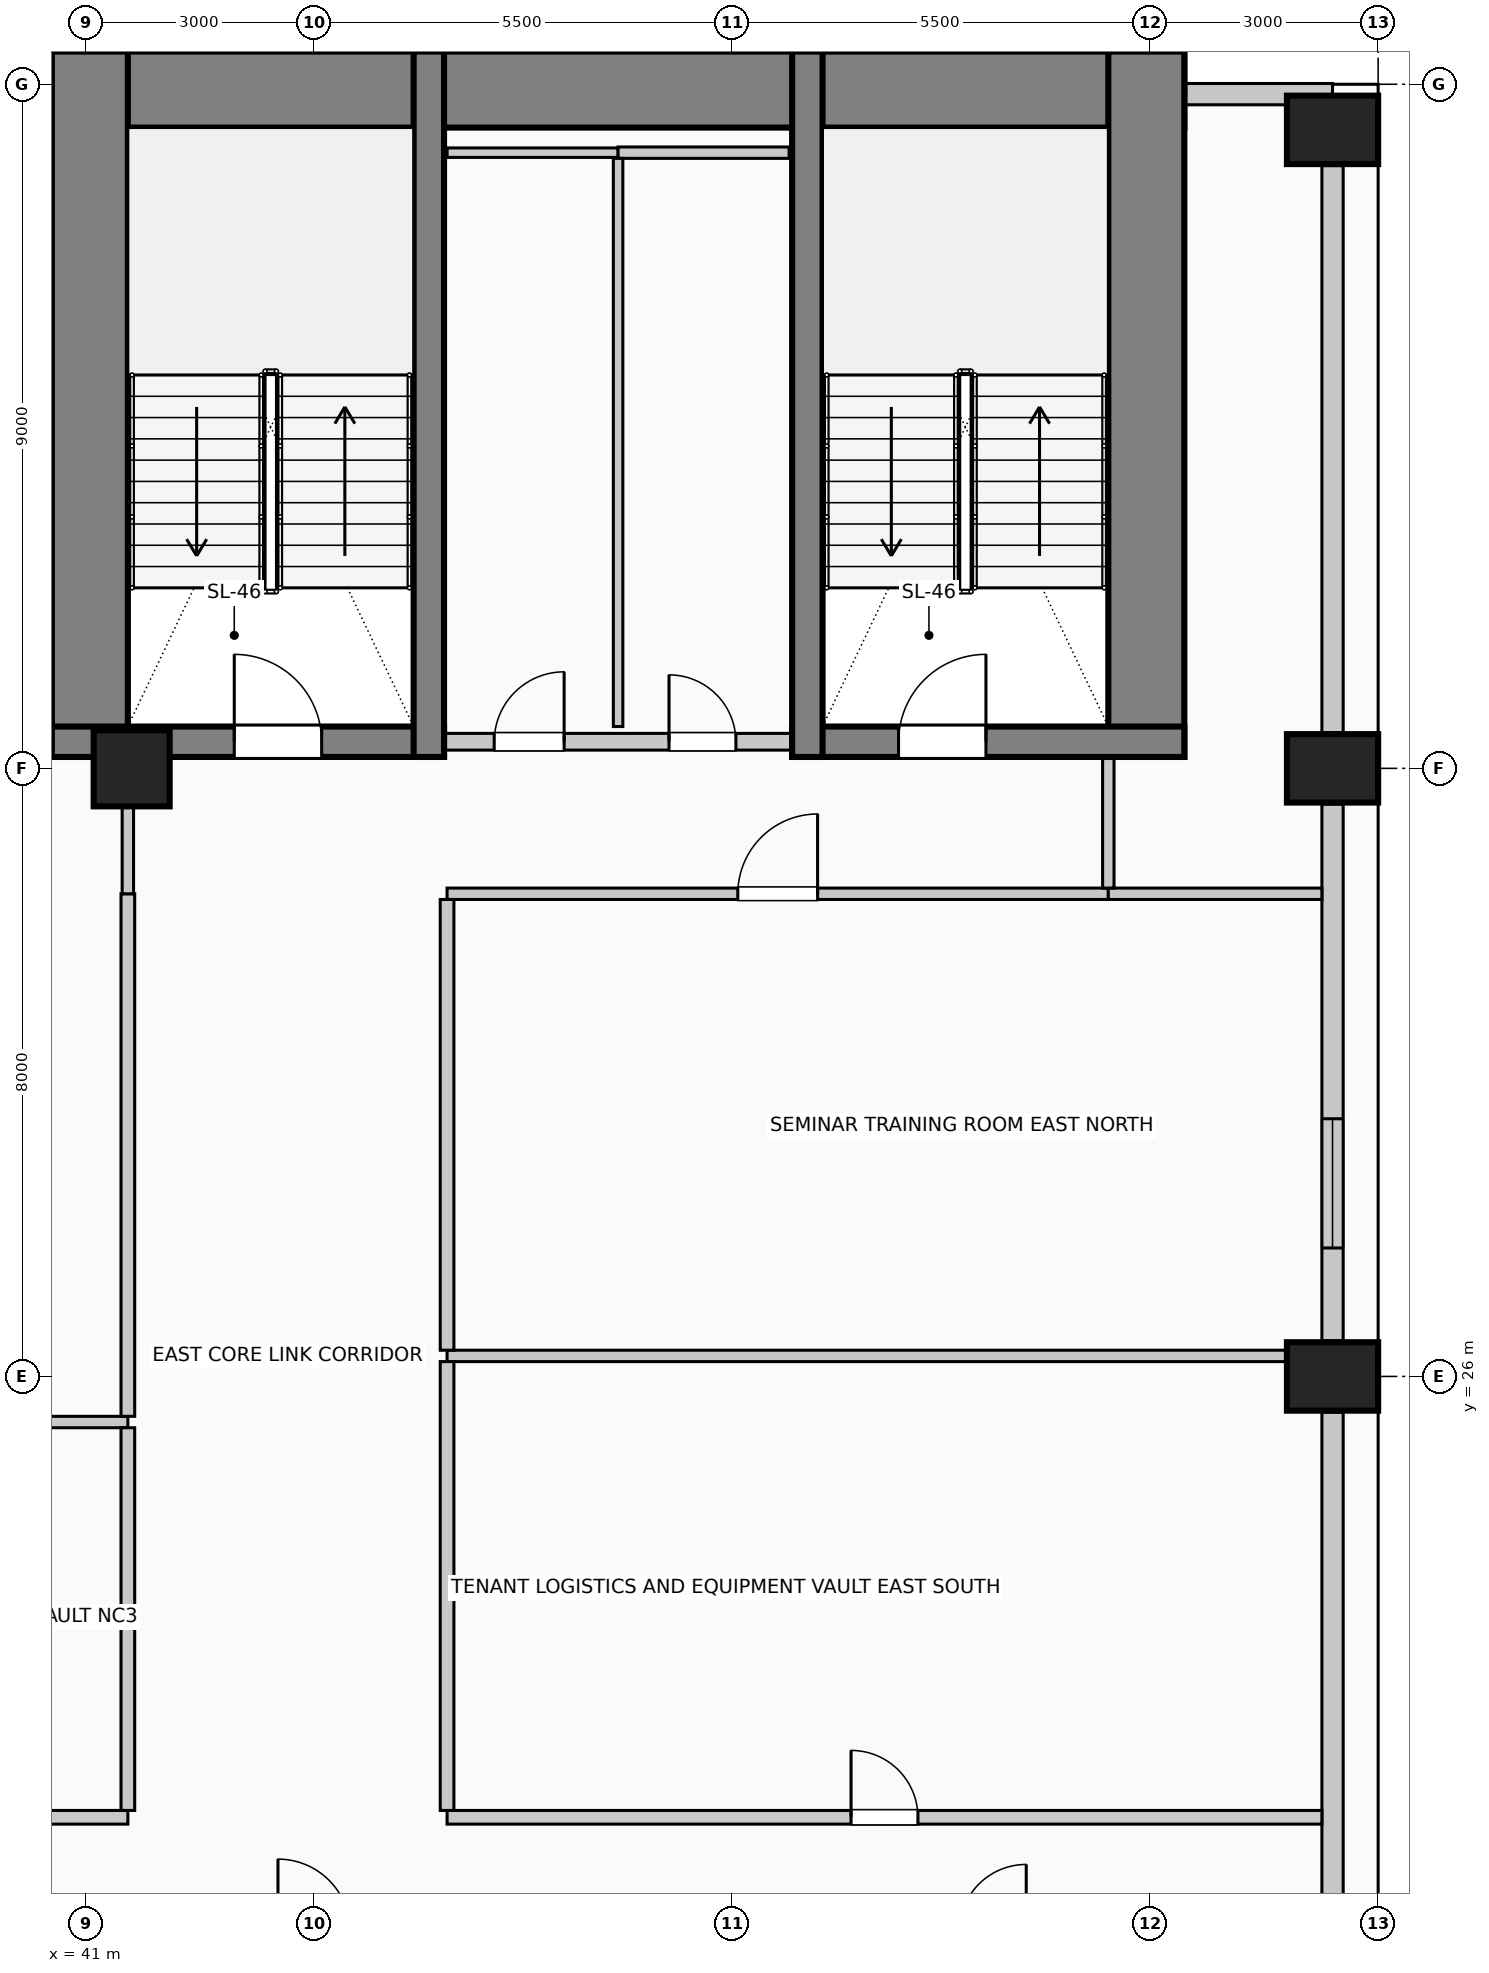
"""IFC4 building model, lengths in metres.
Left out: names, types, materials, properties, quantities, classifications, styles, units other than length and angle.
Written with IfcOpenShell. Run it as: python <this file> out.ifc"""

import sys

from ifc_helpers import new_model, si_unit, direction, frame, frame_2d, origin, origin_2d, place, context, subcontext, project, spatial, rectangle, circle, extrude, element, fill, save


model = new_model("IFC4")
c1 = context("Model", 3, precision=1e-05, world=origin(), true_north=direction((0.0, 1.0)))
c2 = subcontext(c1, "Body", "Model", "MODEL_VIEW")
j1 = project(units=[si_unit("LENGTHUNIT", "METRE"), si_unit("PLANEANGLEUNIT", "RADIAN")], contexts=[c1])
p1 = place(None, origin())
s1 = spatial("IfcSite", under=j1, at=p1, CompositionType="ELEMENT")
p2 = place(p1, origin())
s2 = spatial("IfcBuilding", under=s1, at=p2, CompositionType="ELEMENT")
p3 = place(p2, frame((0.0, 0.0, 78.6)))
s3 = spatial("IfcBuildingStorey", under=s2, at=p3, CompositionType="ELEMENT", Elevation=78.6)
p4 = place(p3, frame((40.55, 42.93, 0.0), z_axis=(0.0, 0.0, 1.0), x_axis=(1.0, 0.0, 0.0)))
e1 = element("IfcWall", 1, at=p4, inside=s3, PredefinedType="SHEAR", context=c2, shape_type="SweptSolid", body=[
    extrude(rectangle(XDim=14.9, YDim=1.0, at=frame_2d((7.45, 0.0))), origin(), (0.0, 0.0, 1.0), 4.0),
])
for number, where, z_axis, x_axis in (
    (2, (41.05, 34.15, 0.0), (0.0, 0.0, 1.0), (0.0, 1.0, 0.0)),
    (3, (54.95, 34.15, 0.0), (0.0, 0.0, 1.0), (0.0, 1.0, 0.0)),
):
    element("IfcWall", number, at=place(p3, frame(where, z_axis=z_axis, x_axis=x_axis)), inside=s3, PredefinedType="SHEAR", context=c2, shape_type="SweptSolid", body=[
        extrude(rectangle(XDim=9.28, YDim=1.0, at=frame_2d((4.64, 0.0))), origin(), (0.0, 0.0, 1.0), 4.0),
    ])
p5 = place(p3, frame((40.55, 34.35, 0.0), z_axis=(0.0, 0.0, 1.0), x_axis=(1.0, 0.0, 0.0)))
e4 = element("IfcWall", 4, at=p5, inside=s3, PredefinedType="SHEAR", context=c2, shape_type="SweptSolid", body=[
    extrude(rectangle(XDim=5.16, YDim=0.4, at=frame_2d((2.58, 0.0))), origin(), (0.0, 0.0, 1.0), 4.0),
])
p6 = place(p5, frame((2.4, 0.0, 0.0)))
e5 = element("IfcOpeningElement", 5, at=p6, cuts=e4, PredefinedType="OPENING", context=c2, shape_type="SweptSolid", body=[
    extrude(rectangle(XDim=1.15, YDim=2.2, at=frame_2d((0.575, 1.1))), frame((0.0, 0.21, 0.0), z_axis=(0.0, -1.0, 0.0), x_axis=(1.0, 0.0, 0.0)), (0.0, 0.0, 1.0), 0.42),
])
p7 = place(p3, frame((45.51, 34.15, 0.0), z_axis=(0.0, 0.0, 1.0), x_axis=(0.0, 1.0, 0.0)))
e6 = element("IfcWall", 6, at=p7, inside=s3, PredefinedType="SHEAR", context=c2, shape_type="SweptSolid", body=[
    extrude(rectangle(XDim=9.28, YDim=0.4, at=frame_2d((4.64, 0.0))), origin(), (0.0, 0.0, 1.0), 4.0),
])
p8 = place(p3, frame((50.29, 34.35, 0.0), z_axis=(0.0, 0.0, 1.0), x_axis=(1.0, 0.0, 0.0)))
e7 = element("IfcWall", 7, at=p8, inside=s3, PredefinedType="SHEAR", context=c2, shape_type="SweptSolid", body=[
    extrude(rectangle(XDim=5.16, YDim=0.4, at=frame_2d((2.58, 0.0))), origin(), (0.0, 0.0, 1.0), 4.0),
])
p9 = place(p8, frame((1.4, 0.0, 0.0)))
e8 = element("IfcOpeningElement", 8, at=p9, cuts=e7, PredefinedType="OPENING", context=c2, shape_type="SweptSolid", body=[
    extrude(rectangle(XDim=1.15, YDim=2.2, at=frame_2d((0.575, 1.1))), frame((0.0, 0.21, 0.0), z_axis=(0.0, -1.0, 0.0), x_axis=(1.0, 0.0, 0.0)), (0.0, 0.0, 1.0), 0.42),
])
p10 = place(p3, frame((50.49, 34.15, 0.0), z_axis=(0.0, 0.0, 1.0), x_axis=(0.0, 1.0, 0.0)))
e9 = element("IfcWall", 9, at=p10, inside=s3, PredefinedType="SHEAR", context=c2, shape_type="SweptSolid", body=[
    extrude(rectangle(XDim=9.28, YDim=0.4, at=frame_2d((4.64, 0.0))), origin(), (0.0, 0.0, 1.0), 4.0),
])
for number, where, z_axis, x_axis in (
    (10, (57.4, 26.0, 0.0), (0.0, 0.0, 1.0), (0.0, 1.0, 0.0)),
    (11, (57.4, 34.0, 0.0), (0.0, 0.0, 1.0), (0.0, 1.0, 0.0)),
    (12, (57.4, 42.4, 0.0), (0.0, 0.0, 1.0), (0.0, 1.0, 0.0)),
):
    element("IfcColumn", number, at=place(p3, frame(where, z_axis=z_axis, x_axis=x_axis)), inside=s3, PredefinedType="COLUMN", context=c2, shape_type="SweptSolid", body=[
        extrude(rectangle(XDim=0.9, YDim=1.2, at=origin_2d()), origin(), (0.0, 0.0, 1.0), 4.0),
    ])
p11 = place(p3, frame((41.6, 34.0, 0.0), z_axis=(0.0, 0.0, 1.0), x_axis=(1.0, 0.0, 0.0)))
e13 = element("IfcColumn", 13, at=p11, inside=s3, PredefinedType="COLUMN", context=c2, shape_type="SweptSolid", body=[
    extrude(circle(Radius=0.5, at=origin_2d()), origin(), (0.0, 0.0, 1.0), 4.0),
])
p12 = place(p3, frame((57.4, 25.53, 0.0), z_axis=(0.0, 0.0, 1.0), x_axis=(0.0, -1.0, 0.0)))
e14 = element("IfcWall", 14, at=p12, inside=s3, PredefinedType="SOLIDWALL", context=c2, shape_type="SweptSolid", body=[
    extrude(rectangle(XDim=7.06, YDim=0.28, at=frame_2d((3.53, 0.0))), origin(), (0.0, 0.0, 1.0), 2.81),
])
p13 = place(p3, frame((57.4, 33.53, 0.0), z_axis=(0.0, 0.0, 1.0), x_axis=(0.0, -1.0, 0.0)))
e15 = element("IfcWall", 15, at=p13, inside=s3, PredefinedType="SOLIDWALL", context=c2, shape_type="SweptSolid", body=[
    extrude(rectangle(XDim=7.06, YDim=0.28, at=frame_2d((3.53, 0.0))), origin(), (0.0, 0.0, 1.0), 2.81),
])
p14 = place(p13, frame((4.14, 0.0, 0.5)))
e16 = element("IfcOpeningElement", 16, at=p14, cuts=e15, PredefinedType="OPENING", context=c2, shape_type="SweptSolid", body=[
    extrude(rectangle(XDim=1.7, YDim=1.95, at=frame_2d((0.85, 0.975))), frame((0.0, 0.15, 0.0), z_axis=(0.0, -1.0, 0.0), x_axis=(1.0, 0.0, 0.0)), (0.0, 0.0, 1.0), 0.3),
])
p15 = place(p3, frame((57.4, 41.93, 0.0), z_axis=(0.0, 0.0, 1.0), x_axis=(0.0, -1.0, 0.0)))
e17 = element("IfcWall", 17, at=p15, inside=s3, PredefinedType="SOLIDWALL", context=c2, shape_type="SweptSolid", body=[
    extrude(rectangle(XDim=7.46, YDim=0.28, at=frame_2d((3.73, 0.0))), origin(), (0.0, 0.0, 1.0), 2.81),
])
p16 = place(p3, frame((55.455, 42.87, 0.0), z_axis=(0.0, 0.0, 1.0), x_axis=(1.0, 0.0, 0.0)))
e18 = element("IfcWall", 18, at=p16, inside=s3, PredefinedType="SOLIDWALL", context=c2, shape_type="SweptSolid", body=[
    extrude(rectangle(XDim=1.945, YDim=0.28, at=frame_2d((0.972, 0.0))), origin(), (0.0, 0.0, 1.0), 3.66),
])
p17 = place(p3, frame((45.72, 34.35, 0.0), z_axis=(0.0, 0.0, 1.0), x_axis=(1.0, 0.0, 0.0)))
e19 = element("IfcWall", 19, at=p17, inside=s3, PredefinedType="PARTITIONING", context=c2, shape_type="SweptSolid", body=[
    extrude(rectangle(XDim=4.56, YDim=0.22, at=frame_2d((2.28, 0.0))), origin(), (0.0, 0.0, 1.0), 3.66),
])
p18 = place(p17, frame((0.65, 0.0, 0.0)))
e20 = element("IfcOpeningElement", 20, at=p18, cuts=e19, PredefinedType="OPENING", context=c2, shape_type="SweptSolid", body=[
    extrude(rectangle(XDim=0.92, YDim=2.1, at=frame_2d((0.46, 1.05))), frame((0.0, 0.12, 0.0), z_axis=(0.0, -1.0, 0.0), x_axis=(1.0, 0.0, 0.0)), (0.0, 0.0, 1.0), 0.24),
])
p19 = place(p17, frame((2.95, 0.0, 0.0)))
e21 = element("IfcOpeningElement", 21, at=p19, cuts=e19, PredefinedType="OPENING", context=c2, shape_type="SweptSolid", body=[
    extrude(rectangle(XDim=0.88, YDim=2.1, at=frame_2d((0.44, 1.05))), frame((0.0, 0.12, 0.0), z_axis=(0.0, -1.0, 0.0), x_axis=(1.0, 0.0, 0.0)), (0.0, 0.0, 1.0), 0.24),
])
p20 = place(p3, frame((24.5, 20.2, 0.0), z_axis=(0.0, 0.0, 1.0), x_axis=(1.0, 0.0, 0.0)))
e22 = element("IfcWall", 22, at=p20, inside=s3, PredefinedType="PARTITIONING", context=c2, shape_type="SweptSolid", body=[
    extrude(rectangle(XDim=17.05, YDim=0.18, at=frame_2d((8.525, 0.0))), origin(), (0.0, 0.0, 1.0), 3.66),
])
p21 = place(p20, frame((8.085, 0.0, 0.0)))
e23 = element("IfcOpeningElement", 23, at=p21, cuts=e22, PredefinedType="OPENING", context=c2, shape_type="SweptSolid", body=[
    extrude(rectangle(XDim=0.88, YDim=2.1, at=frame_2d((0.44, 1.05))), frame((0.0, 0.1, 0.0), z_axis=(0.0, -1.0, 0.0), x_axis=(1.0, 0.0, 0.0)), (0.0, 0.0, 1.0), 0.2),
])
p22 = place(p3, frame((45.75, 20.2, 0.0), z_axis=(0.0, 0.0, 1.0), x_axis=(1.0, 0.0, 0.0)))
e24 = element("IfcWall", 24, at=p22, inside=s3, PredefinedType="PARTITIONING", context=c2, shape_type="SweptSolid", body=[
    extrude(rectangle(XDim=11.51, YDim=0.18, at=frame_2d((5.755, 0.0))), origin(), (0.0, 0.0, 1.0), 3.66),
])
p23 = place(p22, frame((5.315, 0.0, 0.0)))
e25 = element("IfcOpeningElement", 25, at=p23, cuts=e24, PredefinedType="OPENING", context=c2, shape_type="SweptSolid", body=[
    extrude(rectangle(XDim=0.88, YDim=2.1, at=frame_2d((0.44, 1.05))), frame((0.0, 0.1, 0.0), z_axis=(0.0, -1.0, 0.0), x_axis=(1.0, 0.0, 0.0)), (0.0, 0.0, 1.0), 0.2),
])
p24 = place(p3, frame((24.5, 25.4, 0.0), z_axis=(0.0, 0.0, 1.0), x_axis=(1.0, 0.0, 0.0)))
e26 = element("IfcWall", 26, at=p24, inside=s3, PredefinedType="PARTITIONING", context=c2, shape_type="SweptSolid", body=[
    extrude(rectangle(XDim=17.05, YDim=0.15, at=frame_2d((8.525, 0.0))), origin(), (0.0, 0.0, 1.0), 3.055),
])
p25 = place(p3, frame((45.75, 26.27, 0.0), z_axis=(0.0, 0.0, 1.0), x_axis=(1.0, 0.0, 0.0)))
e27 = element("IfcWall", 27, at=p25, inside=s3, PredefinedType="PARTITIONING", context=c2, shape_type="SweptSolid", body=[
    extrude(rectangle(XDim=11.05, YDim=0.15, at=frame_2d((5.525, 0.0))), origin(), (0.0, 0.0, 1.0), 3.66),
])
p26 = place(p3, frame((45.75, 32.35, 0.0), z_axis=(0.0, 0.0, 1.0), x_axis=(1.0, 0.0, 0.0)))
e28 = element("IfcWall", 28, at=p26, inside=s3, PredefinedType="PARTITIONING", context=c2, shape_type="SweptSolid", body=[
    extrude(rectangle(XDim=8.7, YDim=0.15, at=frame_2d((4.35, 0.0))), origin(), (0.0, 0.0, 1.0), 3.66),
])
p27 = place(p26, frame((3.825, 0.0, 0.0)))
e29 = element("IfcOpeningElement", 29, at=p27, cuts=e28, PredefinedType="OPENING", context=c2, shape_type="SweptSolid", body=[
    extrude(rectangle(XDim=1.05, YDim=2.15, at=frame_2d((0.525, 1.075))), frame((0.0, 0.085, 0.0), z_axis=(0.0, -1.0, 0.0), x_axis=(1.0, 0.0, 0.0)), (0.0, 0.0, 1.0), 0.17),
])
p28 = place(p3, frame((54.45, 32.35, 0.0), z_axis=(0.0, 0.0, 1.0), x_axis=(1.0, 0.0, 0.0)))
e30 = element("IfcWall", 30, at=p28, inside=s3, PredefinedType="PARTITIONING", context=c2, shape_type="SweptSolid", body=[
    extrude(rectangle(XDim=2.81, YDim=0.15, at=frame_2d((1.405, 0.0))), origin(), (0.0, 0.0, 1.0), 3.66),
])
p29 = place(p3, frame((45.75, 42.1, 0.0), z_axis=(0.0, 0.0, 1.0), x_axis=(1.0, 0.0, 0.0)))
e31 = element("IfcWall", 31, at=p29, inside=s3, PredefinedType="PARTITIONING", context=c2, shape_type="SweptSolid", body=[
    extrude(rectangle(XDim=2.25, YDim=0.125, at=frame_2d((1.125, 0.0))), origin(), (0.0, 0.0, 1.0), 3.66),
])
p30 = place(p3, frame((48.0, 42.1, 0.0), z_axis=(0.0, 0.0, 1.0), x_axis=(1.0, 0.0, 0.0)))
e32 = element("IfcWall", 32, at=p30, inside=s3, PredefinedType="PARTITIONING", context=c2, shape_type="SweptSolid", body=[
    extrude(rectangle(XDim=2.25, YDim=0.15, at=frame_2d((1.125, 0.0))), origin(), (0.0, 0.0, 1.0), 3.66),
])
p31 = place(p3, frame((41.55, 20.29, 0.0), z_axis=(0.0, 0.0, 1.0), x_axis=(0.0, 1.0, 0.0)))
e33 = element("IfcWall", 33, at=p31, inside=s3, PredefinedType="PARTITIONING", context=c2, shape_type="SweptSolid", body=[
    extrude(rectangle(XDim=5.035, YDim=0.18, at=frame_2d((2.518, 0.0))), origin(), (0.0, 0.0, 1.0), 2.955),
])
p32 = place(p3, frame((41.55, 25.475, 0.0), z_axis=(0.0, 0.0, 1.0), x_axis=(0.0, 1.0, 0.0)))
e34 = element("IfcWall", 34, at=p32, inside=s3, PredefinedType="PARTITIONING", context=c2, shape_type="SweptSolid", body=[
    extrude(rectangle(XDim=6.875, YDim=0.18, at=frame_2d((3.438, 0.0))), origin(), (0.0, 0.0, 1.0), 2.955),
])
p33 = place(p3, frame((41.55, 32.35, 0.0), z_axis=(0.0, 0.0, 1.0), x_axis=(0.0, 1.0, 0.0)))
e35 = element("IfcWall", 35, at=p33, inside=s3, PredefinedType="PARTITIONING", context=c2, shape_type="SweptSolid", body=[
    extrude(rectangle(XDim=1.15, YDim=0.15, at=frame_2d((0.575, 0.0))), origin(), (0.0, 0.0, 1.0), 2.955),
])
p34 = place(p3, frame((41.55, 43.43, 0.0), z_axis=(0.0, 0.0, 1.0), x_axis=(0.0, 1.0, 0.0)))
e36 = element("IfcWall", 36, at=p34, inside=s3, PredefinedType="PARTITIONING", context=c2, shape_type="SweptSolid", body=[
    extrude(rectangle(XDim=1.22, YDim=0.15, at=frame_2d((0.61, 0.0))), origin(), (0.0, 0.0, 1.0), 3.66),
])
p35 = place(p3, frame((45.75, 20.29, 0.0), z_axis=(0.0, 0.0, 1.0), x_axis=(0.0, 1.0, 0.0)))
e37 = element("IfcWall", 37, at=p35, inside=s3, PredefinedType="PARTITIONING", context=c2, shape_type="SweptSolid", body=[
    extrude(rectangle(XDim=5.905, YDim=0.18, at=frame_2d((2.953, 0.0))), origin(), (0.0, 0.0, 1.0), 3.66),
])
p36 = place(p3, frame((45.75, 26.345, 0.0), z_axis=(0.0, 0.0, 1.0), x_axis=(0.0, 1.0, 0.0)))
e38 = element("IfcWall", 38, at=p36, inside=s3, PredefinedType="PARTITIONING", context=c2, shape_type="SweptSolid", body=[
    extrude(rectangle(XDim=5.93, YDim=0.18, at=frame_2d((2.965, 0.0))), origin(), (0.0, 0.0, 1.0), 3.66),
])
p37 = place(p3, frame((48.0, 34.55, 0.0), z_axis=(0.0, 0.0, 1.0), x_axis=(0.0, 1.0, 0.0)))
e39 = element("IfcWall", 39, at=p37, inside=s3, PredefinedType="PARTITIONING", context=c2, shape_type="SweptSolid", body=[
    extrude(rectangle(XDim=7.475, YDim=0.125, at=frame_2d((3.737, 0.0))), origin(), (0.0, 0.0, 1.0), 3.66),
])
p38 = place(p3, frame((54.45, 32.425, 0.0), z_axis=(0.0, 0.0, 1.0), x_axis=(0.0, 1.0, 0.0)))
e40 = element("IfcWall", 40, at=p38, inside=s3, PredefinedType="PARTITIONING", context=c2, shape_type="SweptSolid", body=[
    extrude(rectangle(XDim=1.725, YDim=0.15, at=frame_2d((0.862, 0.0))), origin(), (0.0, 0.0, 1.0), 3.66),
])
p39 = place(p14, origin())
e41 = element("IfcWindow", 41, at=p39, inside=s3, PartitioningType="SINGLE_PANEL", PredefinedType="WINDOW", context=c2, shape_type="SweptSolid", body=[
    extrude(rectangle(XDim=1.7, YDim=1.95, at=frame_2d((0.85, 0.975))), frame((0.0, 0.03, 0.0), z_axis=(0.0, -1.0, 0.0), x_axis=(1.0, 0.0, 0.0)), (0.0, 0.0, 1.0), 0.06),
])
fill(e16, e41)
p40 = place(p6, origin())
e42 = element("IfcDoor", 42, at=p40, inside=s3, OperationType="SINGLE_SWING_LEFT", PredefinedType="DOOR", context=c2, shape_type="SweptSolid", body=[
    extrude(rectangle(XDim=1.15, YDim=2.2, at=frame_2d((0.575, 1.1))), frame((0.0, 0.025, 0.0), z_axis=(0.0, -1.0, 0.0), x_axis=(1.0, 0.0, 0.0)), (0.0, 0.0, 1.0), 0.05),
])
fill(e5, e42)
p41 = place(p18, origin())
e43 = element("IfcDoor", 43, at=p41, inside=s3, OperationType="SINGLE_SWING_RIGHT", PredefinedType="DOOR", context=c2, shape_type="SweptSolid", body=[
    extrude(rectangle(XDim=0.92, YDim=2.1, at=frame_2d((0.46, 1.05))), frame((0.0, 0.025, 0.0), z_axis=(0.0, -1.0, 0.0), x_axis=(1.0, 0.0, 0.0)), (0.0, 0.0, 1.0), 0.05),
])
fill(e20, e43)
p42 = place(p19, origin())
e44 = element("IfcDoor", 44, at=p42, inside=s3, OperationType="SINGLE_SWING_LEFT", PredefinedType="DOOR", context=c2, shape_type="SweptSolid", body=[
    extrude(rectangle(XDim=0.88, YDim=2.1, at=frame_2d((0.44, 1.05))), frame((0.0, 0.025, 0.0), z_axis=(0.0, -1.0, 0.0), x_axis=(1.0, 0.0, 0.0)), (0.0, 0.0, 1.0), 0.05),
])
fill(e21, e44)
p43 = place(p9, origin())
e45 = element("IfcDoor", 45, at=p43, inside=s3, OperationType="SINGLE_SWING_RIGHT", PredefinedType="DOOR", context=c2, shape_type="SweptSolid", body=[
    extrude(rectangle(XDim=1.15, YDim=2.2, at=frame_2d((0.575, 1.1))), frame((0.0, 0.025, 0.0), z_axis=(0.0, -1.0, 0.0), x_axis=(1.0, 0.0, 0.0)), (0.0, 0.0, 1.0), 0.05),
])
fill(e8, e45)
p44 = place(p23, origin())
e46 = element("IfcDoor", 46, at=p44, inside=s3, OperationType="SINGLE_SWING_LEFT", PredefinedType="DOOR", context=c2, shape_type="SweptSolid", body=[
    extrude(rectangle(XDim=0.88, YDim=2.1, at=frame_2d((0.44, 1.05))), frame((0.0, 0.025, 0.0), z_axis=(0.0, -1.0, 0.0), x_axis=(1.0, 0.0, 0.0)), (0.0, 0.0, 1.0), 0.05),
])
fill(e25, e46)
p45 = place(p27, origin())
e47 = element("IfcDoor", 47, at=p45, inside=s3, OperationType="SINGLE_SWING_RIGHT", PredefinedType="DOOR", context=c2, shape_type="SweptSolid", body=[
    extrude(rectangle(XDim=1.05, YDim=2.15, at=frame_2d((0.525, 1.075))), frame((0.0, 0.025, 0.0), z_axis=(0.0, -1.0, 0.0), x_axis=(1.0, 0.0, 0.0)), (0.0, 0.0, 1.0), 0.05),
])
fill(e29, e47)
save(model, sys.argv[1])
